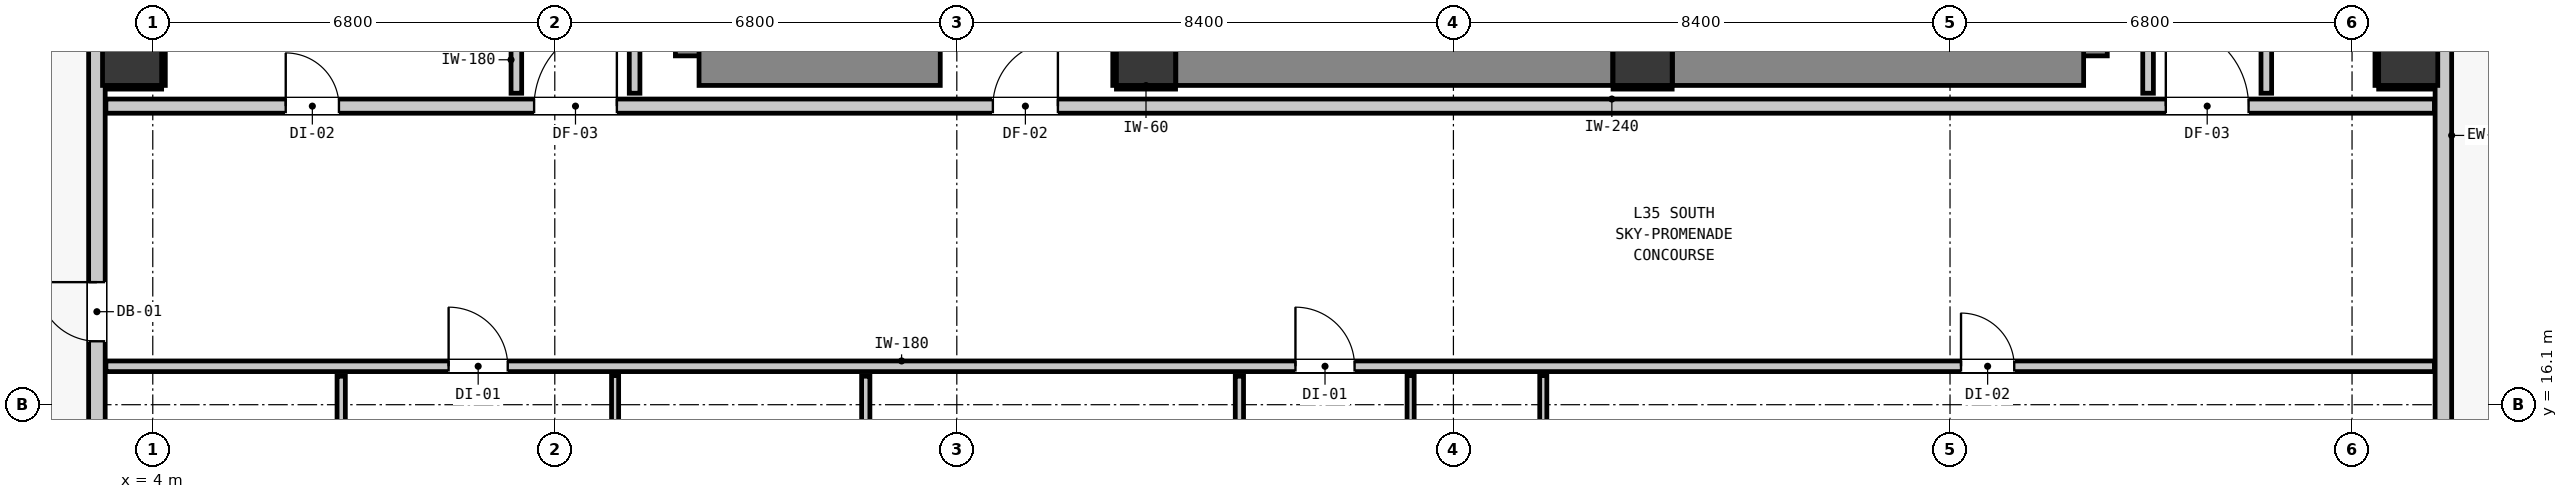
"""IFC4 building model, lengths in metres.
Left out: names, types, materials, properties, quantities, classifications, styles, units other than length and angle.
Written with IfcOpenShell. Run it as: python <this file> out.ifc"""

import sys

from ifc_helpers import new_model, si_unit, direction, frame, frame_2d, origin, origin_2d, place, context, subcontext, project, spatial, rectangle, extrude, element, fill, save


model = new_model("IFC4")
c1 = context("Model", 3, precision=1e-05, world=origin(), true_north=direction((0.0, 1.0)))
c2 = subcontext(c1, "Body", "Model", "MODEL_VIEW")
j1 = project(units=[si_unit("LENGTHUNIT", "METRE"), si_unit("PLANEANGLEUNIT", "RADIAN")], contexts=[c1])
p1 = place(None, origin())
s1 = spatial("IfcSite", under=j1, at=p1, CompositionType="ELEMENT")
p2 = place(p1, origin())
s2 = spatial("IfcBuilding", under=s1, at=p2, CompositionType="ELEMENT")
p3 = place(p2, frame((0.0, 0.0, 122.68)))
s3 = spatial("IfcBuildingStorey", under=s2, at=p3, CompositionType="ELEMENT", Elevation=122.68)
for number, where, z_axis, x_axis in (
    (1, (20.8, 22.0, 0.0), (0.0, 0.0, 1.0), (1.0, 0.0, 0.0)),
    (2, (29.2, 22.0, 0.0), (0.0, 0.0, 1.0), (1.0, 0.0, 0.0)),
):
    element("IfcColumn", number, at=place(p3, frame(where, z_axis=z_axis, x_axis=x_axis)), inside=s3, PredefinedType="COLUMN", context=c2, shape_type="SweptSolid", body=[
        extrude(rectangle(XDim=1.0, YDim=1.0, at=origin_2d()), origin(), (0.0, 0.0, 1.0), 3.32),
    ])
p4 = place(p3, frame((13.34, 22.0, 0.0), z_axis=(0.0, 0.0, 1.0), x_axis=(0.0, 1.0, 0.0)))
e3 = element("IfcWall", 3, at=p4, inside=s3, PredefinedType="SHEAR", context=c2, shape_type="SweptSolid", body=[
    extrude(rectangle(XDim=8.195, YDim=1.0, at=frame_2d((4.098, 0.0))), origin(), (0.0, 0.0, 1.0), 3.32),
])
p5 = place(p3, frame((13.24, 22.0, 0.0), z_axis=(0.0, 0.0, 1.0), x_axis=(1.0, 0.0, 0.0)))
e4 = element("IfcWall", 4, at=p5, inside=s3, PredefinedType="SHEAR", context=c2, shape_type="SweptSolid", body=[
    extrude(rectangle(XDim=4.08, YDim=1.0, at=frame_2d((2.04, 0.0))), origin(), (0.0, 0.0, 1.0), 3.32),
])
p6 = place(p3, frame((36.56, 22.0, 0.0), z_axis=(0.0, 0.0, 1.0), x_axis=(0.0, 1.0, 0.0)))
e5 = element("IfcWall", 5, at=p6, inside=s3, PredefinedType="SHEAR", context=c2, shape_type="SweptSolid", body=[
    extrude(rectangle(XDim=8.195, YDim=1.0, at=frame_2d((4.098, 0.0))), origin(), (0.0, 0.0, 1.0), 3.32),
])
p7 = place(p3, frame((29.705, 22.0, 0.0), z_axis=(0.0, 0.0, 1.0), x_axis=(1.0, 0.0, 0.0)))
e6 = element("IfcWall", 6, at=p7, inside=s3, PredefinedType="SHEAR", context=c2, shape_type="SweptSolid", body=[
    extrude(rectangle(XDim=6.955, YDim=1.0, at=frame_2d((3.478, 0.0))), origin(), (0.0, 0.0, 1.0), 3.32),
])
p8 = place(p3, frame((21.305, 22.0, 0.0), z_axis=(0.0, 0.0, 1.0), x_axis=(1.0, 0.0, 0.0)))
e7 = element("IfcWall", 7, at=p8, inside=s3, PredefinedType="SHEAR", context=c2, shape_type="SweptSolid", body=[
    extrude(rectangle(XDim=7.39, YDim=1.0, at=frame_2d((3.695, 0.0))), origin(), (0.0, 0.0, 1.0), 3.32),
])
for number, where, z_axis, x_axis in (
    (8, (3.65, 22.0, 0.0), (0.0, 0.0, 1.0), (1.0, 0.0, 0.0)),
    (9, (42.15, 22.0, 0.0), (0.0, 0.0, 1.0), (1.0, 0.0, 0.0)),
):
    element("IfcColumn", number, at=place(p3, frame(where, z_axis=z_axis, x_axis=x_axis)), inside=s3, PredefinedType="COLUMN", context=c2, shape_type="SweptSolid", body=[
        extrude(rectangle(XDim=1.0, YDim=1.0, at=origin_2d()), origin(), (0.0, 0.0, 1.0), 2.9),
    ])
p9 = place(p3, frame((3.055, 11.355, 0.0), z_axis=(0.0, 0.0, 1.0), x_axis=(0.0, 1.0, 0.0)))
e10 = element("IfcWall", 10, at=p9, inside=s3, PredefinedType="STANDARD", context=c2, shape_type="SweptSolid", body=[
    extrude(rectangle(XDim=32.29, YDim=0.28, at=frame_2d((16.145, 0.0))), origin(), (0.0, 0.0, 1.0), 2.9),
])
p10 = place(p9, frame((5.818, 0.0, 0.0)))
e11 = element("IfcOpeningElement", 11, at=p10, cuts=e10, PredefinedType="OPENING", context=c2, shape_type="SweptSolid", body=[
    extrude(rectangle(XDim=1.0, YDim=2.15, at=frame_2d((0.5, 1.075))), frame((0.0, 0.15, 0.0), z_axis=(0.0, -1.0, 0.0), x_axis=(1.0, 0.0, 0.0)), (0.0, 0.0, 1.0), 0.3),
])
p11 = place(p9, frame((0.47, 0.0, 0.85)))
e12 = element("IfcOpeningElement", 12, at=p11, cuts=e10, PredefinedType="OPENING", context=c2, shape_type="SweptSolid", body=[
    extrude(rectangle(XDim=1.2, YDim=1.8, at=frame_2d((0.6, 0.9))), frame((0.0, 0.15, 0.0), z_axis=(0.0, -1.0, 0.0), x_axis=(1.0, 0.0, 0.0)), (0.0, 0.0, 1.0), 0.3),
])
p12 = place(p9, frame((14.395, 0.0, 0.85)))
e13 = element("IfcOpeningElement", 13, at=p12, cuts=e10, PredefinedType="OPENING", context=c2, shape_type="SweptSolid", body=[
    extrude(rectangle(XDim=1.2, YDim=1.8, at=frame_2d((0.6, 0.9))), frame((0.0, 0.15, 0.0), z_axis=(0.0, -1.0, 0.0), x_axis=(1.0, 0.0, 0.0)), (0.0, 0.0, 1.0), 0.3),
])
p13 = place(p3, frame((42.745, 43.645, 0.0), z_axis=(0.0, 0.0, 1.0), x_axis=(0.0, -1.0, 0.0)))
e14 = element("IfcWall", 14, at=p13, inside=s3, PredefinedType="STANDARD", context=c2, shape_type="SweptSolid", body=[
    extrude(rectangle(XDim=32.29, YDim=0.28, at=frame_2d((16.145, 0.0))), origin(), (0.0, 0.0, 1.0), 2.9),
])
p14 = place(p13, frame((5.467, 0.0, 0.0)))
e15 = element("IfcOpeningElement", 15, at=p14, cuts=e14, PredefinedType="OPENING", context=c2, shape_type="SweptSolid", body=[
    extrude(rectangle(XDim=1.0, YDim=2.15, at=frame_2d((0.5, 1.075))), frame((0.0, 0.15, 0.0), z_axis=(0.0, -1.0, 0.0), x_axis=(1.0, 0.0, 0.0)), (0.0, 0.0, 1.0), 0.3),
])
p15 = place(p13, frame((28.998, 0.0, 0.85)))
e16 = element("IfcOpeningElement", 16, at=p15, cuts=e14, PredefinedType="OPENING", context=c2, shape_type="SweptSolid", body=[
    extrude(rectangle(XDim=1.2, YDim=1.8, at=frame_2d((0.6, 0.9))), frame((0.0, 0.15, 0.0), z_axis=(0.0, -1.0, 0.0), x_axis=(1.0, 0.0, 0.0)), (0.0, 0.0, 1.0), 0.3),
])
p16 = place(p13, frame((0.318, 0.0, 0.85)))
e17 = element("IfcOpeningElement", 17, at=p16, cuts=e14, PredefinedType="OPENING", context=c2, shape_type="SweptSolid", body=[
    extrude(rectangle(XDim=1.05, YDim=1.65, at=frame_2d((0.525, 0.825))), frame((0.0, 0.15, 0.0), z_axis=(0.0, -1.0, 0.0), x_axis=(1.0, 0.0, 0.0)), (0.0, 0.0, 1.0), 0.3),
])
p17 = place(p13, frame((15.783, 0.0, 0.85)))
e18 = element("IfcOpeningElement", 18, at=p17, cuts=e14, PredefinedType="OPENING", context=c2, shape_type="SweptSolid", body=[
    extrude(rectangle(XDim=1.2, YDim=1.8, at=frame_2d((0.6, 0.9))), frame((0.0, 0.15, 0.0), z_axis=(0.0, -1.0, 0.0), x_axis=(1.0, 0.0, 0.0)), (0.0, 0.0, 1.0), 0.3),
])
p18 = place(p3, frame((3.207, 21.15, 0.0), z_axis=(0.0, 0.0, 1.0), x_axis=(1.0, 0.0, 0.0)))
e19 = element("IfcWall", 19, at=p18, inside=s3, PredefinedType="PARTITIONING", context=c2, shape_type="SweptSolid", body=[
    extrude(rectangle(XDim=39.386, YDim=0.24, at=frame_2d((19.693, 0.0))), origin(), (0.0, 0.0, 1.0), 2.9),
])
p19 = place(p18, frame((15.003, 0.0, 0.0)))
e20 = element("IfcOpeningElement", 20, at=p19, cuts=e19, PredefinedType="OPENING", context=c2, shape_type="SweptSolid", body=[
    extrude(rectangle(XDim=1.1, YDim=2.15, at=frame_2d((0.55, 1.075))), frame((0.0, 0.13, 0.0), z_axis=(0.0, -1.0, 0.0), x_axis=(1.0, 0.0, 0.0)), (0.0, 0.0, 1.0), 0.26),
])
p20 = place(p18, frame((7.243, 0.0, 0.0)))
e21 = element("IfcOpeningElement", 21, at=p20, cuts=e19, PredefinedType="OPENING", context=c2, shape_type="SweptSolid", body=[
    extrude(rectangle(XDim=1.4, YDim=2.15, at=frame_2d((0.7, 1.075))), frame((0.0, 0.13, 0.0), z_axis=(0.0, -1.0, 0.0), x_axis=(1.0, 0.0, 0.0)), (0.0, 0.0, 1.0), 0.26),
])
p21 = place(p18, frame((34.843, 0.0, 0.0)))
e22 = element("IfcOpeningElement", 22, at=p21, cuts=e19, PredefinedType="OPENING", context=c2, shape_type="SweptSolid", body=[
    extrude(rectangle(XDim=1.4, YDim=2.15, at=frame_2d((0.7, 1.075))), frame((0.0, 0.13, 0.0), z_axis=(0.0, -1.0, 0.0), x_axis=(1.0, 0.0, 0.0)), (0.0, 0.0, 1.0), 0.26),
])
p22 = place(p18, frame((3.042, 0.0, 0.0)))
e23 = element("IfcOpeningElement", 23, at=p22, cuts=e19, PredefinedType="OPENING", context=c2, shape_type="SweptSolid", body=[
    extrude(rectangle(XDim=0.9, YDim=2.1, at=frame_2d((0.45, 1.05))), frame((0.0, 0.13, 0.0), z_axis=(0.0, -1.0, 0.0), x_axis=(1.0, 0.0, 0.0)), (0.0, 0.0, 1.0), 0.26),
])
p23 = place(p3, frame((3.207, 16.75, 0.0), z_axis=(0.0, 0.0, 1.0), x_axis=(1.0, 0.0, 0.0)))
e24 = element("IfcWall", 24, at=p23, inside=s3, PredefinedType="PARTITIONING", context=c2, shape_type="SweptSolid", body=[
    extrude(rectangle(XDim=39.386, YDim=0.18, at=frame_2d((19.693, 0.0))), origin(), (0.0, 0.0, 1.0), 2.9),
])
p24 = place(p23, frame((5.797, 0.0, 0.0)))
e25 = element("IfcOpeningElement", 25, at=p24, cuts=e24, PredefinedType="OPENING", context=c2, shape_type="SweptSolid", body=[
    extrude(rectangle(XDim=1.0, YDim=2.15, at=frame_2d((0.5, 1.075))), frame((0.0, 0.1, 0.0), z_axis=(0.0, -1.0, 0.0), x_axis=(1.0, 0.0, 0.0)), (0.0, 0.0, 1.0), 0.2),
])
p25 = place(p23, frame((20.121, 0.0, 0.0)))
e26 = element("IfcOpeningElement", 26, at=p25, cuts=e24, PredefinedType="OPENING", context=c2, shape_type="SweptSolid", body=[
    extrude(rectangle(XDim=1.0, YDim=2.15, at=frame_2d((0.5, 1.075))), frame((0.0, 0.1, 0.0), z_axis=(0.0, -1.0, 0.0), x_axis=(1.0, 0.0, 0.0)), (0.0, 0.0, 1.0), 0.2),
])
p26 = place(p23, frame((31.379, 0.0, 0.0)))
e27 = element("IfcOpeningElement", 27, at=p26, cuts=e24, PredefinedType="OPENING", context=c2, shape_type="SweptSolid", body=[
    extrude(rectangle(XDim=0.9, YDim=2.1, at=frame_2d((0.45, 1.05))), frame((0.0, 0.1, 0.0), z_axis=(0.0, -1.0, 0.0), x_axis=(1.0, 0.0, 0.0)), (0.0, 0.0, 1.0), 0.2),
])
p27 = place(p3, frame((10.15, 21.368, 0.0), z_axis=(0.0, 0.0, 1.0), x_axis=(0.0, 1.0, 0.0)))
e28 = element("IfcWall", 28, at=p27, inside=s3, PredefinedType="PARTITIONING", context=c2, shape_type="SweptSolid", body=[
    extrude(rectangle(XDim=1.132, YDim=0.18, at=frame_2d((0.566, 0.0))), origin(), (0.0, 0.0, 1.0), 2.9),
])
for number, where, z_axis, x_axis in (
    (29, (12.15, 21.368, 0.0), (0.0, 0.0, 1.0), (0.0, 1.0, 0.0)),
    (30, (37.75, 21.368, 0.0), (0.0, 0.0, 1.0), (0.0, 1.0, 0.0)),
):
    element("IfcWall", number, at=place(p3, frame(where, z_axis=z_axis, x_axis=x_axis)), inside=s3, PredefinedType="PARTITIONING", context=c2, shape_type="SweptSolid", body=[
        extrude(rectangle(XDim=18.694, YDim=0.18, at=frame_2d((9.347, 0.0))), origin(), (0.0, 0.0, 1.0), 2.9),
    ])
p28 = place(p3, frame((39.75, 21.368, 0.0), z_axis=(0.0, 0.0, 1.0), x_axis=(0.0, 1.0, 0.0)))
e31 = element("IfcWall", 31, at=p28, inside=s3, PredefinedType="PARTITIONING", context=c2, shape_type="SweptSolid", body=[
    extrude(rectangle(XDim=3.109, YDim=0.18, at=frame_2d((1.555, 0.0))), origin(), (0.0, 0.0, 1.0), 2.9),
])
p29 = place(p3, frame((7.187, 13.652, 0.0), z_axis=(0.0, 0.0, 1.0), x_axis=(0.0, 1.0, 0.0)))
e32 = element("IfcWall", 32, at=p29, inside=s3, PredefinedType="PARTITIONING", context=c2, shape_type="SweptSolid", body=[
    extrude(rectangle(XDim=2.93, YDim=0.14, at=frame_2d((1.465, 0.0))), origin(), (0.0, 0.0, 1.0), 2.9),
])
p30 = place(p29, frame((1.032, 0.0, 0.0)))
e33 = element("IfcOpeningElement", 33, at=p30, cuts=e32, PredefinedType="OPENING", context=c2, shape_type="SweptSolid", body=[
    extrude(rectangle(XDim=0.86, YDim=2.02, at=frame_2d((0.43, 1.01))), frame((0.0, 0.08, 0.0), z_axis=(0.0, -1.0, 0.0), x_axis=(1.0, 0.0, 0.0)), (0.0, 0.0, 1.0), 0.16),
])
p31 = place(p3, frame((16.06, 13.652, 0.0), z_axis=(0.0, 0.0, 1.0), x_axis=(0.0, 1.0, 0.0)))
e34 = element("IfcWall", 34, at=p31, inside=s3, PredefinedType="PARTITIONING", context=c2, shape_type="SweptSolid", body=[
    extrude(rectangle(XDim=2.93, YDim=0.14, at=frame_2d((1.465, 0.0))), origin(), (0.0, 0.0, 1.0), 2.9),
])
p32 = place(p3, frame((22.38, 13.652, 0.0), z_axis=(0.0, 0.0, 1.0), x_axis=(0.0, 1.0, 0.0)))
e35 = element("IfcWall", 35, at=p32, inside=s3, PredefinedType="PARTITIONING", context=c2, shape_type="SweptSolid", body=[
    extrude(rectangle(XDim=2.93, YDim=0.14, at=frame_2d((1.465, 0.0))), origin(), (0.0, 0.0, 1.0), 2.9),
])
p33 = place(p32, frame((1.032, 0.0, 0.0)))
e36 = element("IfcOpeningElement", 36, at=p33, cuts=e35, PredefinedType="OPENING", context=c2, shape_type="SweptSolid", body=[
    extrude(rectangle(XDim=0.86, YDim=2.02, at=frame_2d((0.43, 1.01))), frame((0.0, 0.08, 0.0), z_axis=(0.0, -1.0, 0.0), x_axis=(1.0, 0.0, 0.0)), (0.0, 0.0, 1.0), 0.16),
])
p34 = place(p3, frame((11.82, 9.207, 0.0), z_axis=(0.0, 0.0, 1.0), x_axis=(0.0, 1.0, 0.0)))
e37 = element("IfcWall", 37, at=p34, inside=s3, PredefinedType="PARTITIONING", context=c2, shape_type="SweptSolid", body=[
    extrude(rectangle(XDim=7.385, YDim=0.12, at=frame_2d((3.692, 0.0))), origin(), (0.0, 0.0, 1.0), 2.9),
])
p35 = place(p34, frame((3.318, 0.0, 0.0)))
e38 = element("IfcOpeningElement", 38, at=p35, cuts=e37, PredefinedType="OPENING", context=c2, shape_type="SweptSolid", body=[
    extrude(rectangle(XDim=0.9, YDim=2.1, at=frame_2d((0.45, 1.05))), frame((0.0, 0.07, 0.0), z_axis=(0.0, -1.0, 0.0), x_axis=(1.0, 0.0, 0.0)), (0.0, 0.0, 1.0), 0.14),
])
p36 = place(p3, frame((25.276, 9.207, 0.0), z_axis=(0.0, 0.0, 1.0), x_axis=(0.0, 1.0, 0.0)))
e39 = element("IfcWall", 39, at=p36, inside=s3, PredefinedType="PARTITIONING", context=c2, shape_type="SweptSolid", body=[
    extrude(rectangle(XDim=7.385, YDim=0.12, at=frame_2d((3.692, 0.0))), origin(), (0.0, 0.0, 1.0), 2.9),
])
p37 = place(p36, frame((3.318, 0.0, 0.0)))
e40 = element("IfcOpeningElement", 40, at=p37, cuts=e39, PredefinedType="OPENING", context=c2, shape_type="SweptSolid", body=[
    extrude(rectangle(XDim=0.9, YDim=2.1, at=frame_2d((0.45, 1.05))), frame((0.0, 0.07, 0.0), z_axis=(0.0, -1.0, 0.0), x_axis=(1.0, 0.0, 0.0)), (0.0, 0.0, 1.0), 0.14),
])
p38 = place(p3, frame((27.52, 9.207, 0.0), z_axis=(0.0, 0.0, 1.0), x_axis=(0.0, 1.0, 0.0)))
e41 = element("IfcWall", 41, at=p38, inside=s3, PredefinedType="PARTITIONING", context=c2, shape_type="SweptSolid", body=[
    extrude(rectangle(XDim=7.385, YDim=0.12, at=frame_2d((3.692, 0.0))), origin(), (0.0, 0.0, 1.0), 2.9),
])
for number, where, z_axis, x_axis in (
    (42, (20.3, 21.468, 0.0), (0.0, 0.0, 1.0), (1.0, 0.0, 0.0)),
    (43, (20.268, 21.5, 0.0), (0.0, 0.0, 1.0), (0.0, 1.0, 0.0)),
    (44, (28.7, 21.468, 0.0), (0.0, 0.0, 1.0), (1.0, 0.0, 0.0)),
):
    element("IfcWall", number, at=place(p3, frame(where, z_axis=z_axis, x_axis=x_axis)), inside=s3, PredefinedType="PARTITIONING", context=c2, shape_type="SweptSolid", body=[
        extrude(rectangle(XDim=1.0, YDim=0.06, at=frame_2d((0.5, 0.0))), origin(), (0.0, 0.0, 1.0), 0.905),
    ])
p39 = place(p3, frame((3.21, 21.468, 0.0), z_axis=(0.0, 0.0, 1.0), x_axis=(1.0, 0.0, 0.0)))
e45 = element("IfcWall", 45, at=p39, inside=s3, PredefinedType="PARTITIONING", context=c2, shape_type="SweptSolid", body=[
    extrude(rectangle(XDim=0.94, YDim=0.06, at=frame_2d((0.47, 0.0))), origin(), (0.0, 0.0, 1.0), 0.905),
])
p40 = place(p3, frame((4.182, 21.5, 0.0), z_axis=(0.0, 0.0, 1.0), x_axis=(0.0, 1.0, 0.0)))
e46 = element("IfcWall", 46, at=p40, inside=s3, PredefinedType="PARTITIONING", context=c2, shape_type="SweptSolid", body=[
    extrude(rectangle(XDim=1.0, YDim=0.06, at=frame_2d((0.5, 0.0))), origin(), (0.0, 0.0, 1.0), 1.45),
])
p41 = place(p3, frame((41.65, 21.468, 0.0), z_axis=(0.0, 0.0, 1.0), x_axis=(1.0, 0.0, 0.0)))
e47 = element("IfcWall", 47, at=p41, inside=s3, PredefinedType="PARTITIONING", context=c2, shape_type="SweptSolid", body=[
    extrude(rectangle(XDim=0.94, YDim=0.06, at=frame_2d((0.47, 0.0))), origin(), (0.0, 0.0, 1.0), 0.905),
])
p42 = place(p3, frame((41.618, 21.5, 0.0), z_axis=(0.0, 0.0, 1.0), x_axis=(0.0, 1.0, 0.0)))
e48 = element("IfcWall", 48, at=p42, inside=s3, PredefinedType="PARTITIONING", context=c2, shape_type="SweptSolid", body=[
    extrude(rectangle(XDim=1.0, YDim=0.06, at=frame_2d((0.5, 0.0))), origin(), (0.0, 0.0, 1.0), 1.45),
])
p43 = place(p10, origin())
e49 = element("IfcDoor", 49, at=p43, inside=s3, OperationType="SINGLE_SWING_RIGHT", PredefinedType="DOOR", context=c2, shape_type="SweptSolid", body=[
    extrude(rectangle(XDim=1.0, YDim=2.15, at=frame_2d((0.5, 1.075))), frame((0.0, 0.025, 0.0), z_axis=(0.0, -1.0, 0.0), x_axis=(1.0, 0.0, 0.0)), (0.0, 0.0, 1.0), 0.05),
])
fill(e11, e49)
p44 = place(p19, origin())
e50 = element("IfcDoor", 50, at=p44, inside=s3, OperationType="SINGLE_SWING_RIGHT", PredefinedType="DOOR", context=c2, shape_type="SweptSolid", body=[
    extrude(rectangle(XDim=1.1, YDim=2.15, at=frame_2d((0.55, 1.075))), frame((0.0, 0.025, 0.0), z_axis=(0.0, -1.0, 0.0), x_axis=(1.0, 0.0, 0.0)), (0.0, 0.0, 1.0), 0.05),
])
fill(e20, e50)
p45 = place(p20, origin())
e51 = element("IfcDoor", 51, at=p45, inside=s3, OperationType="SINGLE_SWING_RIGHT", PredefinedType="DOOR", context=c2, shape_type="SweptSolid", body=[
    extrude(rectangle(XDim=1.4, YDim=2.15, at=frame_2d((0.7, 1.075))), frame((0.0, 0.025, 0.0), z_axis=(0.0, -1.0, 0.0), x_axis=(1.0, 0.0, 0.0)), (0.0, 0.0, 1.0), 0.05),
])
fill(e21, e51)
p46 = place(p21, origin())
e52 = element("IfcDoor", 52, at=p46, inside=s3, OperationType="SINGLE_SWING_LEFT", PredefinedType="DOOR", context=c2, shape_type="SweptSolid", body=[
    extrude(rectangle(XDim=1.4, YDim=2.15, at=frame_2d((0.7, 1.075))), frame((0.0, 0.025, 0.0), z_axis=(0.0, -1.0, 0.0), x_axis=(1.0, 0.0, 0.0)), (0.0, 0.0, 1.0), 0.05),
])
fill(e22, e52)
p47 = place(p24, origin())
e53 = element("IfcDoor", 53, at=p47, inside=s3, OperationType="SINGLE_SWING_LEFT", PredefinedType="DOOR", context=c2, shape_type="SweptSolid", body=[
    extrude(rectangle(XDim=1.0, YDim=2.15, at=frame_2d((0.5, 1.075))), frame((0.0, 0.025, 0.0), z_axis=(0.0, -1.0, 0.0), x_axis=(1.0, 0.0, 0.0)), (0.0, 0.0, 1.0), 0.05),
])
fill(e25, e53)
p48 = place(p25, origin())
e54 = element("IfcDoor", 54, at=p48, inside=s3, OperationType="SINGLE_SWING_LEFT", PredefinedType="DOOR", context=c2, shape_type="SweptSolid", body=[
    extrude(rectangle(XDim=1.0, YDim=2.15, at=frame_2d((0.5, 1.075))), frame((0.0, 0.025, 0.0), z_axis=(0.0, -1.0, 0.0), x_axis=(1.0, 0.0, 0.0)), (0.0, 0.0, 1.0), 0.05),
])
fill(e26, e54)
p49 = place(p26, origin())
e55 = element("IfcDoor", 55, at=p49, inside=s3, OperationType="SINGLE_SWING_LEFT", PredefinedType="DOOR", context=c2, shape_type="SweptSolid", body=[
    extrude(rectangle(XDim=0.9, YDim=2.1, at=frame_2d((0.45, 1.05))), frame((0.0, 0.025, 0.0), z_axis=(0.0, -1.0, 0.0), x_axis=(1.0, 0.0, 0.0)), (0.0, 0.0, 1.0), 0.05),
])
fill(e27, e55)
p50 = place(p22, origin())
e56 = element("IfcDoor", 56, at=p50, inside=s3, OperationType="SINGLE_SWING_LEFT", PredefinedType="DOOR", context=c2, shape_type="SweptSolid", body=[
    extrude(rectangle(XDim=0.9, YDim=2.1, at=frame_2d((0.45, 1.05))), frame((0.0, 0.025, 0.0), z_axis=(0.0, -1.0, 0.0), x_axis=(1.0, 0.0, 0.0)), (0.0, 0.0, 1.0), 0.05),
])
fill(e23, e56)
save(model, sys.argv[1])
